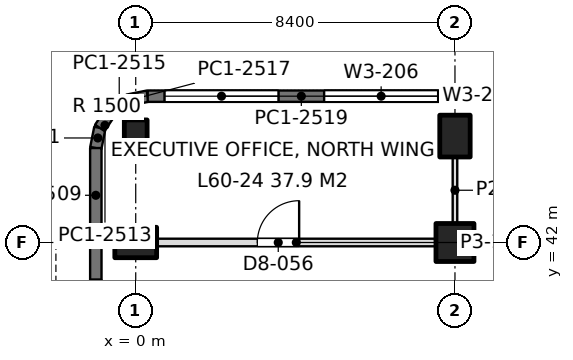
"""IFC4 building model, lengths in metres.
Left out: names, types, materials, properties, quantities, classifications, styles, units other than length and angle.
Written with IfcOpenShell. Run it as: python <this file> out.ifc"""

import sys

from ifc_helpers import new_model, si_unit, direction, frame, frame_2d, origin, origin_2d, place, context, subcontext, project, spatial, rectangle, extrude, element, fill, save


model = new_model("IFC4")
c1 = context("Model", 3, precision=1e-05, world=origin(), true_north=direction((0.0, 1.0)))
c2 = subcontext(c1, "Body", "Model", "MODEL_VIEW")
j1 = project(units=[si_unit("LENGTHUNIT", "METRE"), si_unit("PLANEANGLEUNIT", "RADIAN")], contexts=[c1])
p1 = place(None, origin())
s1 = spatial("IfcSite", under=j1, at=p1, CompositionType="ELEMENT")
p2 = place(p1, origin())
s2 = spatial("IfcBuilding", under=s1, at=p2, CompositionType="ELEMENT")
p3 = place(p2, frame((0.0, 0.0, 263.7)))
s3 = spatial("IfcBuildingStorey", under=s2, at=p3, CompositionType="ELEMENT", Elevation=263.7)
p4 = place(p3, frame((0.0, 42.0, 0.0), z_axis=(0.0, 0.0, 1.0), x_axis=(0.0, 1.0, 0.0)))
e1 = element("IfcColumn", 1, at=p4, inside=s3, PredefinedType="COLUMN", context=c2, shape_type="SweptSolid", body=[
    extrude(rectangle(XDim=0.8, YDim=1.1, at=origin_2d()), origin(), (0.0, 0.0, 1.0), 4.5),
])
p5 = place(p3, frame((0.0, 44.8, 0.0), z_axis=(0.0, 0.0, 1.0), x_axis=(1.0, 0.0, 0.0)))
e2 = element("IfcColumn", 2, at=p5, inside=s3, PredefinedType="COLUMN", context=c2, shape_type="SweptSolid", body=[
    extrude(rectangle(XDim=0.6, YDim=0.85, at=origin_2d()), origin(), (0.0, 0.0, 1.0), 4.5),
])
p6 = place(p3, frame((8.4, 42.0, 0.0), z_axis=(0.0, 0.0, 1.0), x_axis=(1.0, 0.0, 0.0)))
e3 = element("IfcColumn", 3, at=p6, inside=s3, PredefinedType="COLUMN", context=c2, shape_type="SweptSolid", body=[
    extrude(rectangle(XDim=1.0, YDim=1.0, at=origin_2d()), origin(), (0.0, 0.0, 1.0), 4.5),
])
p7 = place(p3, frame((8.4, 44.8, 0.0), z_axis=(0.0, 0.0, 1.0), x_axis=(1.0, 0.0, 0.0)))
e4 = element("IfcColumn", 4, at=p7, inside=s3, PredefinedType="COLUMN", context=c2, shape_type="SweptSolid", body=[
    extrude(rectangle(XDim=0.8, YDim=1.1, at=origin_2d()), origin(), (0.0, 0.0, 1.0), 4.5),
])
p8 = place(p3, frame((-1.05, 37.65, 0.0), z_axis=(0.0, 0.0, 1.0), x_axis=(0.0, 1.0, 0.0)))
e5 = element("IfcWall", 5, at=p8, inside=s3, PredefinedType="SOLIDWALL", context=c2, shape_type="SweptSolid", body=[
    extrude(rectangle(XDim=4.35, YDim=0.3, at=frame_2d((2.175, 0.0))), origin(), (0.0, 0.0, 1.0), 4.35),
])
p9 = place(p8, frame((0.975, 0.0, 0.9)))
e6 = element("IfcOpeningElement", 6, at=p9, cuts=e5, PredefinedType="OPENING", context=c2, shape_type="SweptSolid", body=[
    extrude(rectangle(XDim=2.4, YDim=1.9, at=frame_2d((1.2, 0.95))), frame((0.0, 0.16, 0.0), z_axis=(0.0, -1.0, 0.0), x_axis=(1.0, 0.0, 0.0)), (0.0, 0.0, 1.0), 0.32),
])
p10 = place(p3, frame((-1.05, 42.0, 0.0), z_axis=(0.0, 0.0, 1.0), x_axis=(0.0, 1.0, 0.0)))
e7 = element("IfcWall", 7, at=p10, inside=s3, PredefinedType="SOLIDWALL", context=c2, shape_type="SweptSolid", body=[
    extrude(rectangle(XDim=2.485, YDim=0.3, at=frame_2d((1.243, 0.0))), origin(), (0.0, 0.0, 1.0), 4.35),
])
p11 = place(p3, frame((-1.05, 44.485, 0.0), z_axis=(0.0, 0.0, 1.0), x_axis=(0.195073962632, 0.980788534345, 0.0)))
e8 = element("IfcWall", 8, at=p11, inside=s3, PredefinedType="SOLIDWALL", context=c2, shape_type="SweptSolid", body=[
    extrude(rectangle(XDim=0.541, YDim=0.3, at=frame_2d((0.271, 0.0))), origin(), (0.0, 0.0, 1.0), 4.35),
])
p12 = place(p3, frame((-0.945, 45.015, 0.0), z_axis=(0.0, 0.0, 1.0), x_axis=(0.55534295404, 0.831621430339, 0.0)))
e9 = element("IfcWall", 9, at=p12, inside=s3, PredefinedType="SOLIDWALL", context=c2, shape_type="SweptSolid", body=[
    extrude(rectangle(XDim=0.526, YDim=0.3, at=frame_2d((0.263, 0.0))), origin(), (0.0, 0.0, 1.0), 4.35),
])
p13 = place(p3, frame((-0.653, 45.453, 0.0), z_axis=(0.0, 0.0, 1.0), x_axis=(0.831692711774, 0.555236195849, 0.0)))
e10 = element("IfcWall", 10, at=p13, inside=s3, PredefinedType="SOLIDWALL", context=c2, shape_type="SweptSolid", body=[
    extrude(rectangle(XDim=0.525, YDim=0.3, at=frame_2d((0.263, 0.0))), origin(), (0.0, 0.0, 1.0), 4.35),
])
p14 = place(p3, frame((-0.216, 45.744, 0.0), z_axis=(0.0, 0.0, 1.0), x_axis=(0.980702050465, 0.1955082817, 0.0)))
e11 = element("IfcWall", 11, at=p14, inside=s3, PredefinedType="SOLIDWALL", context=c2, shape_type="SweptSolid", body=[
    extrude(rectangle(XDim=0.541, YDim=0.3, at=frame_2d((0.271, 0.0))), origin(), (0.0, 0.0, 1.0), 4.35),
])
p15 = place(p3, frame((0.315, 45.85, 0.0), z_axis=(0.0, 0.0, 1.0), x_axis=(1.0, 0.0, 0.0)))
e12 = element("IfcWall", 12, at=p15, inside=s3, PredefinedType="SOLIDWALL", context=c2, shape_type="SweptSolid", body=[
    extrude(rectangle(XDim=8.085, YDim=0.3, at=frame_2d((4.042, 0.0))), origin(), (0.0, 0.0, 1.0), 4.35),
])
p16 = place(p15, frame((0.443, 0.0, 0.9)))
e13 = element("IfcOpeningElement", 13, at=p16, cuts=e12, PredefinedType="OPENING", context=c2, shape_type="SweptSolid", body=[
    extrude(rectangle(XDim=3.0, YDim=2.4, at=frame_2d((1.5, 1.2))), frame((0.0, 0.16, 0.0), z_axis=(0.0, -1.0, 0.0), x_axis=(1.0, 0.0, 0.0)), (0.0, 0.0, 1.0), 0.32),
])
p17 = place(p15, frame((4.643, 0.0, 0.9)))
e14 = element("IfcOpeningElement", 14, at=p17, cuts=e12, PredefinedType="OPENING", context=c2, shape_type="SweptSolid", body=[
    extrude(rectangle(XDim=3.0, YDim=2.4, at=frame_2d((1.5, 1.2))), frame((0.0, 0.16, 0.0), z_axis=(0.0, -1.0, 0.0), x_axis=(1.0, 0.0, 0.0)), (0.0, 0.0, 1.0), 0.32),
])
p18 = place(p3, frame((8.4, 45.85, 0.0), z_axis=(0.0, 0.0, 1.0), x_axis=(1.0, 0.0, 0.0)))
e15 = element("IfcWall", 15, at=p18, inside=s3, PredefinedType="SOLIDWALL", context=c2, shape_type="SweptSolid", body=[
    extrude(rectangle(XDim=8.4, YDim=0.3, at=frame_2d((4.2, 0.0))), origin(), (0.0, 0.0, 1.0), 4.35),
])
p19 = place(p18, frame((0.6, 0.0, 0.9)))
e16 = element("IfcOpeningElement", 16, at=p19, cuts=e15, PredefinedType="OPENING", context=c2, shape_type="SweptSolid", body=[
    extrude(rectangle(XDim=3.0, YDim=2.4, at=frame_2d((1.5, 1.2))), frame((0.0, 0.16, 0.0), z_axis=(0.0, -1.0, 0.0), x_axis=(1.0, 0.0, 0.0)), (0.0, 0.0, 1.0), 0.32),
])
p20 = place(p18, frame((4.8, 0.0, 0.9)))
e17 = element("IfcOpeningElement", 17, at=p20, cuts=e15, PredefinedType="OPENING", context=c2, shape_type="SweptSolid", body=[
    extrude(rectangle(XDim=3.0, YDim=2.4, at=frame_2d((1.5, 1.2))), frame((0.0, 0.16, 0.0), z_axis=(0.0, -1.0, 0.0), x_axis=(1.0, 0.0, 0.0)), (0.0, 0.0, 1.0), 0.32),
])
p21 = place(p3, frame((0.549, 42.0, 0.0), z_axis=(0.0, 0.0, 1.0), x_axis=(1.0, 0.0, 0.0)))
e18 = element("IfcWall", 18, at=p21, inside=s3, PredefinedType="PARTITIONING", context=c2, shape_type="SweptSolid", body=[
    extrude(rectangle(XDim=7.352, YDim=0.2, at=frame_2d((3.676, 0.0))), origin(), (0.0, 0.0, 1.0), 3.8),
])
p22 = place(p21, frame((2.651, 0.0, 0.0)))
e19 = element("IfcOpeningElement", 19, at=p22, cuts=e18, PredefinedType="OPENING", context=c2, shape_type="SweptSolid", body=[
    extrude(rectangle(XDim=1.1, YDim=2.4, at=frame_2d((0.55, 1.2))), frame((0.0, 0.11, 0.0), z_axis=(0.0, -1.0, 0.0), x_axis=(1.0, 0.0, 0.0)), (0.0, 0.0, 1.0), 0.22),
])
p23 = place(p3, frame((8.4, 42.499, 0.0), z_axis=(0.0, 0.0, 1.0), x_axis=(0.0, 1.0, 0.0)))
e20 = element("IfcWall", 20, at=p23, inside=s3, PredefinedType="PARTITIONING", context=c2, shape_type="SweptSolid", body=[
    extrude(rectangle(XDim=1.752, YDim=0.12, at=frame_2d((0.876, 0.0))), origin(), (0.0, 0.0, 1.0), 3.99),
])
p24 = place(p9, origin())
e21 = element("IfcWindow", 21, at=p24, inside=s3, PartitioningType="SINGLE_PANEL", PredefinedType="WINDOW", context=c2, shape_type="SweptSolid", body=[
    extrude(rectangle(XDim=2.4, YDim=1.9, at=frame_2d((1.2, 0.95))), frame((0.0, 0.03, 0.0), z_axis=(0.0, -1.0, 0.0), x_axis=(1.0, 0.0, 0.0)), (0.0, 0.0, 1.0), 0.06),
])
fill(e6, e21)
p25 = place(p16, origin())
e22 = element("IfcWindow", 22, at=p25, inside=s3, PartitioningType="SINGLE_PANEL", PredefinedType="WINDOW", context=c2, shape_type="SweptSolid", body=[
    extrude(rectangle(XDim=3.0, YDim=2.4, at=frame_2d((1.5, 1.2))), frame((0.0, 0.03, 0.0), z_axis=(0.0, -1.0, 0.0), x_axis=(1.0, 0.0, 0.0)), (0.0, 0.0, 1.0), 0.06),
])
fill(e13, e22)
p26 = place(p17, origin())
e23 = element("IfcWindow", 23, at=p26, inside=s3, PartitioningType="SINGLE_PANEL", PredefinedType="WINDOW", context=c2, shape_type="SweptSolid", body=[
    extrude(rectangle(XDim=3.0, YDim=2.4, at=frame_2d((1.5, 1.2))), frame((0.0, 0.03, 0.0), z_axis=(0.0, -1.0, 0.0), x_axis=(1.0, 0.0, 0.0)), (0.0, 0.0, 1.0), 0.06),
])
fill(e14, e23)
p27 = place(p19, origin())
e24 = element("IfcWindow", 24, at=p27, inside=s3, PartitioningType="SINGLE_PANEL", PredefinedType="WINDOW", context=c2, shape_type="SweptSolid", body=[
    extrude(rectangle(XDim=3.0, YDim=2.4, at=frame_2d((1.5, 1.2))), frame((0.0, 0.03, 0.0), z_axis=(0.0, -1.0, 0.0), x_axis=(1.0, 0.0, 0.0)), (0.0, 0.0, 1.0), 0.06),
])
fill(e16, e24)
p28 = place(p22, origin())
e25 = element("IfcDoor", 25, at=p28, inside=s3, OperationType="SINGLE_SWING_RIGHT", PredefinedType="DOOR", context=c2, shape_type="SweptSolid", body=[
    extrude(rectangle(XDim=1.1, YDim=2.4, at=frame_2d((0.55, 1.2))), frame((0.0, 0.025, 0.0), z_axis=(0.0, -1.0, 0.0), x_axis=(1.0, 0.0, 0.0)), (0.0, 0.0, 1.0), 0.05),
])
fill(e19, e25)
save(model, sys.argv[1])
